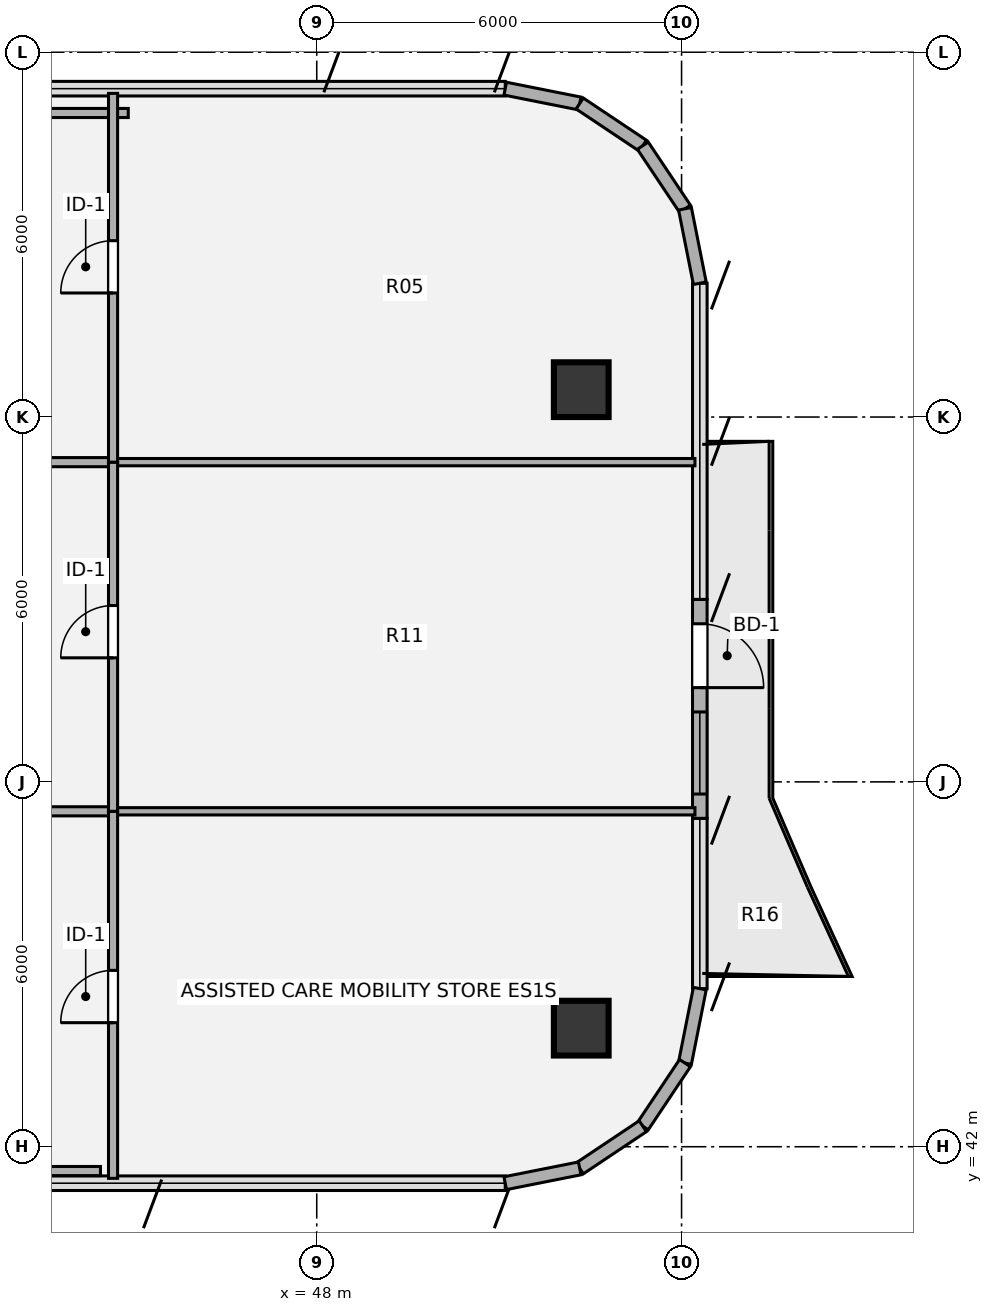
"""IFC4 building model, lengths in metres.
Left out: names, types, materials, properties, quantities, classifications, styles, units other than length and angle.
Written with IfcOpenShell. Run it as: python <this file> out.ifc"""

import sys

from ifc_helpers import new_model, si_unit, direction, frame, frame_2d, origin, origin_2d, place, context, subcontext, project, spatial, rectangle, hollow_circle, extrude, source, transform, mapped, element, fill, save


model = new_model("IFC4")
c1 = context("Model", 3, precision=1e-05, world=origin(), true_north=direction((0.0, 1.0)))
c2 = subcontext(c1, "Body", "Model", "MODEL_VIEW")
j1 = project(units=[si_unit("LENGTHUNIT", "METRE"), si_unit("PLANEANGLEUNIT", "RADIAN")], contexts=[c1])
p1 = place(None, origin())
s1 = spatial("IfcSite", under=j1, at=p1, CompositionType="ELEMENT")
p2 = place(p1, origin())
s2 = spatial("IfcBuilding", under=s1, at=p2, CompositionType="ELEMENT")
p3 = place(p2, frame((0.0, 0.0, 238.14)))
s3 = spatial("IfcBuildingStorey", under=s2, at=p3, CompositionType="ELEMENT", Elevation=238.14)
m1 = source(origin(), c2, "Body", "SweptSolid", [
    extrude(hollow_circle(Radius=0.45, WallThickness=0.032, at=origin_2d()), origin(), (0.0, 0.0, 1.0), 3.78),
])
for number, where, z_axis, x_axis in (
    (1, (52.35, 43.95, 0.0), (0.0, 0.0, 1.0), (1.0, 0.0, 0.0)),
    (2, (52.35, 54.45, 0.0), (0.0, 0.0, 1.0), (1.0, 0.0, 0.0)),
):
    element("IfcColumn", number, at=place(p3, frame(where, z_axis=z_axis, x_axis=x_axis)), inside=s3, PredefinedType="COLUMN", context=c2, shape_type="MappedRepresentation", body=[
        mapped(m1, transform((0.0, 0.0, 0.0), x_axis=(1.0, 0.0, 0.0), y_axis=(0.0, 1.0, 0.0), z_axis=(0.0, 0.0, 1.0), scale=1.0)),
    ])
for number, where, z_axis, x_axis in (
    (3, (51.1, 59.4, 0.0), (0.0, 0.0, 1.0), (0.981, -0.195, 0.0)),
    (4, (52.325, 59.156, 0.0), (0.0, 0.0, 1.0), (0.831, -0.556, 0.0)),
    (5, (53.363, 58.463, 0.0), (0.0, 0.0, 1.0), (0.556, -0.831, 0.0)),
    (6, (54.056, 57.425, 0.0), (0.0, 0.0, 1.0), (0.195, -0.981, 0.0)),
):
    element("IfcWall", number, at=place(p3, frame(where, z_axis=z_axis, x_axis=x_axis)), inside=s3, PredefinedType="SOLIDWALL", context=c2, shape_type="SweptSolid", body=[
        extrude(rectangle(XDim=1.249, YDim=0.215, at=frame_2d((0.624, 0.0))), origin(), (0.0, 0.0, 1.0), 3.53),
    ])
p4 = place(p3, frame((54.3, 51.0, 0.0), z_axis=(0.0, 0.0, 1.0), x_axis=(0.0, -1.0, 0.0)))
e7 = element("IfcWall", 7, at=p4, inside=s3, PredefinedType="SOLIDWALL", context=c2, shape_type="SweptSolid", body=[
    extrude(rectangle(XDim=3.6, YDim=0.24, at=frame_2d((1.8, 0.0))), origin(), (0.0, 0.0, 1.0), 3.53),
])
p5 = place(p4, frame((0.4, 0.0, 0.0)))
e8 = element("IfcOpeningElement", 8, at=p5, cuts=e7, PredefinedType="OPENING", context=c2, shape_type="SweptSolid", body=[
    extrude(rectangle(XDim=1.05, YDim=2.15, at=origin_2d()), frame((0.525, 0.13, 1.075), z_axis=(0.0, -1.0, 0.0), x_axis=(1.0, 0.0, 0.0)), (0.0, 0.0, 1.0), 0.26),
])
p6 = place(p4, frame((1.85, 0.0, 0.85)))
e9 = element("IfcOpeningElement", 9, at=p6, cuts=e7, PredefinedType="OPENING", context=c2, shape_type="SweptSolid", body=[
    extrude(rectangle(XDim=1.35, YDim=1.35, at=origin_2d()), frame((0.675, 0.13, 0.675), z_axis=(0.0, -1.0, 0.0), x_axis=(1.0, 0.0, 0.0)), (0.0, 0.0, 1.0), 0.26),
])
for number, where, z_axis, x_axis in (
    (10, (54.3, 44.6, 0.0), (0.0, 0.0, 1.0), (-0.195, -0.981, 0.0)),
    (11, (54.056, 43.375, 0.0), (0.0, 0.0, 1.0), (-0.556, -0.831, 0.0)),
    (12, (53.363, 42.337, 0.0), (0.0, 0.0, 1.0), (-0.831, -0.556, 0.0)),
    (13, (52.325, 41.644, 0.0), (0.0, 0.0, 1.0), (-0.981, -0.195, 0.0)),
):
    element("IfcWall", number, at=place(p3, frame(where, z_axis=z_axis, x_axis=x_axis)), inside=s3, PredefinedType="SOLIDWALL", context=c2, shape_type="SweptSolid", body=[
        extrude(rectangle(XDim=1.249, YDim=0.215, at=frame_2d((0.624, 0.0))), origin(), (0.0, 0.0, 1.0), 3.53),
    ])
p7 = place(p3, frame((38.45, 41.6, 0.0), z_axis=(0.0, 0.0, 1.0), x_axis=(1.0, 0.0, 0.0)))
e14 = element("IfcWall", 14, at=p7, inside=s3, PredefinedType="PARTITIONING", context=c2, shape_type="SweptSolid", body=[
    extrude(rectangle(XDim=5.993, YDim=0.15, at=frame_2d((2.997, 0.0))), origin(), (0.0, 0.0, 1.0), 3.5),
])
p8 = place(p3, frame((38.45, 47.516, 0.0), z_axis=(0.0, 0.0, 1.0), x_axis=(1.0, 0.0, 0.0)))
e15 = element("IfcWall", 15, at=p8, inside=s3, PredefinedType="PARTITIONING", context=c2, shape_type="SweptSolid", body=[
    extrude(rectangle(XDim=6.2, YDim=0.15, at=frame_2d((3.1, 0.0))), origin(), (0.0, 0.0, 1.0), 2.982),
])
p9 = place(p3, frame((44.65, 47.516, 0.0), z_axis=(0.0, 0.0, 1.0), x_axis=(1.0, 0.0, 0.0)))
e16 = element("IfcWall", 16, at=p9, inside=s3, PredefinedType="PARTITIONING", context=c2, shape_type="SweptSolid", body=[
    extrude(rectangle(XDim=9.57, YDim=0.12, at=frame_2d((4.785, 0.0))), origin(), (0.0, 0.0, 1.0), 2.982),
])
p10 = place(p3, frame((38.45, 53.258, 0.0), z_axis=(0.0, 0.0, 1.0), x_axis=(1.0, 0.0, 0.0)))
e17 = element("IfcWall", 17, at=p10, inside=s3, PredefinedType="PARTITIONING", context=c2, shape_type="SweptSolid", body=[
    extrude(rectangle(XDim=6.2, YDim=0.15, at=frame_2d((3.1, 0.0))), origin(), (0.0, 0.0, 1.0), 3.055),
])
p11 = place(p3, frame((44.65, 53.258, 0.0), z_axis=(0.0, 0.0, 1.0), x_axis=(1.0, 0.0, 0.0)))
e18 = element("IfcWall", 18, at=p11, inside=s3, PredefinedType="PARTITIONING", context=c2, shape_type="SweptSolid", body=[
    extrude(rectangle(XDim=9.57, YDim=0.12, at=frame_2d((4.785, 0.0))), origin(), (0.0, 0.0, 1.0), 3.055),
])
p12 = place(p3, frame((27.1, 59.0, 0.0), z_axis=(0.0, 0.0, 1.0), x_axis=(1.0, 0.0, 0.0)))
e19 = element("IfcWall", 19, at=p12, inside=s3, PredefinedType="PARTITIONING", context=c2, shape_type="SweptSolid", body=[
    extrude(rectangle(XDim=17.8, YDim=0.15, at=frame_2d((8.9, 0.0))), origin(), (0.0, 0.0, 1.0), 3.308),
])
p13 = place(p12, frame((8.375, 0.0, 0.0)))
e20 = element("IfcOpeningElement", 20, at=p13, cuts=e19, PredefinedType="OPENING", context=c2, shape_type="SweptSolid", body=[
    extrude(rectangle(XDim=1.05, YDim=2.1, at=origin_2d()), frame((0.525, 0.085, 1.05), z_axis=(0.0, -1.0, 0.0), x_axis=(1.0, 0.0, 0.0)), (0.0, 0.0, 1.0), 0.17),
])
p14 = place(p3, frame((44.65, 41.48, 0.0), z_axis=(0.0, 0.0, 1.0), x_axis=(0.0, 1.0, 0.0)))
e21 = element("IfcWall", 21, at=p14, inside=s3, PredefinedType="PARTITIONING", context=c2, shape_type="SweptSolid", body=[
    extrude(rectangle(XDim=6.036, YDim=0.15, at=frame_2d((3.018, 0.0))), origin(), (0.0, 0.0, 1.0), 3.5),
])
p15 = place(p14, frame((2.56, 0.0, 0.0)))
e22 = element("IfcOpeningElement", 22, at=p15, cuts=e21, PredefinedType="OPENING", context=c2, shape_type="SweptSolid", body=[
    extrude(rectangle(XDim=0.86, YDim=2.1, at=origin_2d()), frame((0.43, 0.085, 1.05), z_axis=(0.0, -1.0, 0.0), x_axis=(1.0, 0.0, 0.0)), (0.0, 0.0, 1.0), 0.17),
])
p16 = place(p3, frame((44.65, 47.516, 0.0), z_axis=(0.0, 0.0, 1.0), x_axis=(0.0, 1.0, 0.0)))
e23 = element("IfcWall", 23, at=p16, inside=s3, PredefinedType="PARTITIONING", context=c2, shape_type="SweptSolid", body=[
    extrude(rectangle(XDim=5.742, YDim=0.15, at=frame_2d((2.871, 0.0))), origin(), (0.0, 0.0, 1.0), 3.5),
])
p17 = place(p16, frame((2.524, 0.0, 0.0)))
e24 = element("IfcOpeningElement", 24, at=p17, cuts=e23, PredefinedType="OPENING", context=c2, shape_type="SweptSolid", body=[
    extrude(rectangle(XDim=0.86, YDim=2.1, at=origin_2d()), frame((0.43, 0.085, 1.05), z_axis=(0.0, -1.0, 0.0), x_axis=(1.0, 0.0, 0.0)), (0.0, 0.0, 1.0), 0.17),
])
p18 = place(p3, frame((44.65, 53.258, 0.0), z_axis=(0.0, 0.0, 1.0), x_axis=(0.0, 1.0, 0.0)))
e25 = element("IfcWall", 25, at=p18, inside=s3, PredefinedType="PARTITIONING", context=c2, shape_type="SweptSolid", body=[
    extrude(rectangle(XDim=6.064, YDim=0.15, at=frame_2d((3.032, 0.0))), origin(), (0.0, 0.0, 1.0), 3.5),
])
p19 = place(p18, frame((2.782, 0.0, 0.0)))
e26 = element("IfcOpeningElement", 26, at=p19, cuts=e25, PredefinedType="OPENING", context=c2, shape_type="SweptSolid", body=[
    extrude(rectangle(XDim=0.86, YDim=2.1, at=origin_2d()), frame((0.43, 0.085, 1.05), z_axis=(0.0, -1.0, 0.0), x_axis=(1.0, 0.0, 0.0)), (0.0, 0.0, 1.0), 0.17),
])
m2 = source(origin(), c2, "Body", "SweptSolid", [
    extrude(rectangle(XDim=1.05, YDim=2.15, at=origin_2d()), frame((0.525, 0.025, 1.075), z_axis=(0.0, -1.0, 0.0), x_axis=(1.0, 0.0, 0.0)), (0.0, 0.0, 1.0), 0.05),
])
p20 = place(p5, origin())
e27 = element("IfcDoor", 27, at=p20, inside=s3, OperationType="SINGLE_SWING_RIGHT", PredefinedType="DOOR", context=c2, shape_type="MappedRepresentation", body=[
    mapped(m2, transform((0.0, 0.0, 0.0), x_axis=(1.0, 0.0, 0.0), y_axis=(0.0, 1.0, 0.0), z_axis=(0.0, 0.0, 1.0), scale=1.0)),
])
fill(e8, e27)
m3 = source(origin(), c2, "Body", "SweptSolid", [
    extrude(rectangle(XDim=1.35, YDim=1.35, at=origin_2d()), frame((0.675, 0.03, 0.675), z_axis=(0.0, -1.0, 0.0), x_axis=(1.0, 0.0, 0.0)), (0.0, 0.0, 1.0), 0.06),
])
p21 = place(p6, origin())
e28 = element("IfcWindow", 28, at=p21, inside=s3, PartitioningType="SINGLE_PANEL", PredefinedType="WINDOW", context=c2, shape_type="MappedRepresentation", body=[
    mapped(m3, transform((0.0, 0.0, 0.0), x_axis=(1.0, 0.0, 0.0), y_axis=(0.0, 1.0, 0.0), z_axis=(0.0, 0.0, 1.0), scale=1.0)),
])
fill(e9, e28)
m4 = source(origin(), c2, "Body", "SweptSolid", [
    extrude(rectangle(XDim=0.86, YDim=2.1, at=origin_2d()), frame((0.43, 0.025, 1.05), z_axis=(0.0, -1.0, 0.0), x_axis=(1.0, 0.0, 0.0)), (0.0, 0.0, 1.0), 0.05),
])
p22 = place(p15, origin())
e29 = element("IfcDoor", 29, at=p22, inside=s3, OperationType="SINGLE_SWING_LEFT", PredefinedType="DOOR", context=c2, shape_type="MappedRepresentation", body=[
    mapped(m4, transform((0.0, 0.0, 0.0), x_axis=(1.0, 0.0, 0.0), y_axis=(0.0, 1.0, 0.0), z_axis=(0.0, 0.0, 1.0), scale=1.0)),
])
fill(e22, e29)
p23 = place(p17, origin())
e30 = element("IfcDoor", 30, at=p23, inside=s3, OperationType="SINGLE_SWING_LEFT", PredefinedType="DOOR", context=c2, shape_type="MappedRepresentation", body=[
    mapped(m4, transform((0.0, 0.0, 0.0), x_axis=(1.0, 0.0, 0.0), y_axis=(0.0, 1.0, 0.0), z_axis=(0.0, 0.0, 1.0), scale=1.0)),
])
fill(e24, e30)
p24 = place(p19, origin())
e31 = element("IfcDoor", 31, at=p24, inside=s3, OperationType="SINGLE_SWING_LEFT", PredefinedType="DOOR", context=c2, shape_type="MappedRepresentation", body=[
    mapped(m4, transform((0.0, 0.0, 0.0), x_axis=(1.0, 0.0, 0.0), y_axis=(0.0, 1.0, 0.0), z_axis=(0.0, 0.0, 1.0), scale=1.0)),
])
fill(e26, e31)
save(model, sys.argv[1])
